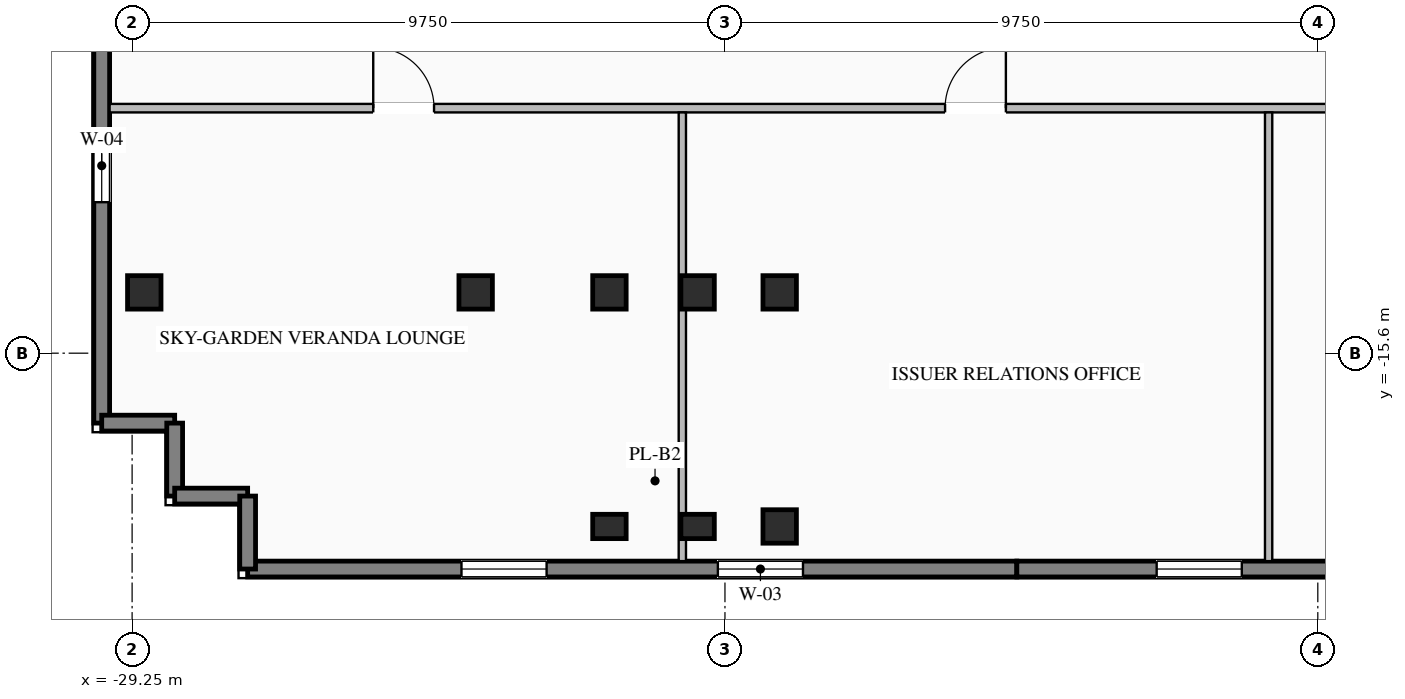
"""IFC4 building model, lengths in metres.
Left out: names, types, materials, properties, quantities, classifications, styles, units other than length and angle.
Written with IfcOpenShell. Run it as: python <this file> out.ifc"""

import sys

from ifc_helpers import new_model, si_unit, direction, frame, frame_2d, origin, origin_2d, place, context, subcontext, project, spatial, rectangle, i_section, extrude, element, fill, save


model = new_model("IFC4")
c1 = context("Model", 3, precision=1e-05, world=origin(), true_north=direction((0.0, 1.0)))
c2 = subcontext(c1, "Body", "Model", "MODEL_VIEW")
j1 = project(units=[si_unit("LENGTHUNIT", "METRE"), si_unit("PLANEANGLEUNIT", "RADIAN")], contexts=[c1])
p1 = place(None, origin())
s1 = spatial("IfcSite", under=j1, at=p1, CompositionType="ELEMENT")
p2 = place(p1, origin())
s2 = spatial("IfcBuilding", under=s1, at=p2, CompositionType="ELEMENT")
p3 = place(p2, frame((0.0, 0.0, 236.1)))
s3 = spatial("IfcBuildingStorey", under=s2, at=p3, CompositionType="ELEMENT", Elevation=236.1)
for number, where, z_axis, x_axis in (
    (1, (-21.4, -14.6, 0.0), (0.0, 0.0, 1.0), (1.0, 0.0, 0.0)),
    (2, (-19.95, -14.6, 0.0), (0.0, 0.0, 1.0), (1.0, 0.0, 0.0)),
    (3, (-18.6, -14.6, 0.0), (0.0, 0.0, 1.0), (1.0, 0.0, 0.0)),
    (4, (-23.6, -14.6, 0.0), (0.0, 0.0, 1.0), (1.0, 0.0, 0.0)),
    (5, (-18.6, -18.45, 0.0), (0.0, 0.0, 1.0), (1.0, 0.0, 0.0)),
    (6, (-29.05, -14.6, 0.0), (0.0, 0.0, 1.0), (1.0, 0.0, 0.0)),
):
    element("IfcColumn", number, at=place(p3, frame(where, z_axis=z_axis, x_axis=x_axis)), inside=s3, PredefinedType="COLUMN", context=c2, shape_type="SweptSolid", body=[
        extrude(i_section(OverallWidth=0.55, OverallDepth=0.55, WebThickness=0.024, FlangeThickness=0.036, at=origin_2d()), origin(), (0.0, 0.0, 1.0), 3.45),
    ])
for number, where, z_axis, x_axis in (
    (7, (-21.4, -18.45, 0.0), (0.0, 0.0, 1.0), (1.0, 0.0, 0.0)),
    (8, (-19.95, -18.45, 0.0), (0.0, 0.0, 1.0), (1.0, 0.0, 0.0)),
):
    element("IfcColumn", number, at=place(p3, frame(where, z_axis=z_axis, x_axis=x_axis)), inside=s3, PredefinedType="PILASTER", context=c2, shape_type="SweptSolid", body=[
        extrude(rectangle(XDim=0.55, YDim=0.4, at=origin_2d()), origin(), (0.0, 0.0, 1.0), 3.45),
    ])
p4 = place(p3, frame((-14.7, -19.15, 0.0), z_axis=(0.0, 0.0, 1.0), x_axis=(-1.0, 0.0, 0.0)))
e9 = element("IfcWall", 9, at=p4, inside=s3, PredefinedType="STANDARD", context=c2, shape_type="SweptSolid", body=[
    extrude(rectangle(XDim=12.65, YDim=0.26, at=frame_2d((6.325, 0.0))), origin(), (0.0, 0.0, 1.0), 3.25),
])
p5 = place(p4, frame((3.517, 0.0, 0.76)))
e10 = element("IfcOpeningElement", 10, at=p5, cuts=e9, PredefinedType="OPENING", context=c2, shape_type="SweptSolid", body=[
    extrude(rectangle(XDim=1.4, YDim=1.95, at=frame_2d((0.7, 0.975))), frame((0.0, 0.14, 0.0), z_axis=(0.0, -1.0, 0.0), x_axis=(1.0, 0.0, 0.0)), (0.0, 0.0, 1.0), 0.28),
])
p6 = place(p4, frame((7.733, 0.0, 0.76)))
e11 = element("IfcOpeningElement", 11, at=p6, cuts=e9, PredefinedType="OPENING", context=c2, shape_type="SweptSolid", body=[
    extrude(rectangle(XDim=1.4, YDim=1.95, at=frame_2d((0.7, 0.975))), frame((0.0, 0.14, 0.0), z_axis=(0.0, -1.0, 0.0), x_axis=(1.0, 0.0, 0.0)), (0.0, 0.0, 1.0), 0.28),
])
p7 = place(p3, frame((-5.7, -19.15, 0.0), z_axis=(0.0, 0.0, 1.0), x_axis=(-1.0, 0.0, 0.0)))
e12 = element("IfcWall", 12, at=p7, inside=s3, PredefinedType="STANDARD", context=c2, shape_type="SweptSolid", body=[
    extrude(rectangle(XDim=9.0, YDim=0.26, at=frame_2d((4.5, 0.0))), origin(), (0.0, 0.0, 1.0), 3.25),
])
p8 = place(p7, frame((2.3, 0.0, 0.76)))
e13 = element("IfcOpeningElement", 13, at=p8, cuts=e12, PredefinedType="OPENING", context=c2, shape_type="SweptSolid", body=[
    extrude(rectangle(XDim=1.4, YDim=1.95, at=frame_2d((0.7, 0.975))), frame((0.0, 0.14, 0.0), z_axis=(0.0, -1.0, 0.0), x_axis=(1.0, 0.0, 0.0)), (0.0, 0.0, 1.0), 0.28),
])
p9 = place(p7, frame((5.3, 0.0, 0.76)))
e14 = element("IfcOpeningElement", 14, at=p9, cuts=e12, PredefinedType="OPENING", context=c2, shape_type="SweptSolid", body=[
    extrude(rectangle(XDim=1.4, YDim=1.95, at=frame_2d((0.7, 0.975))), frame((0.0, 0.14, 0.0), z_axis=(0.0, -1.0, 0.0), x_axis=(1.0, 0.0, 0.0)), (0.0, 0.0, 1.0), 0.28),
])
p10 = place(p3, frame((-29.75, -16.75, 0.0), z_axis=(0.0, 0.0, 1.0), x_axis=(0.0, 1.0, 0.0)))
e15 = element("IfcWall", 15, at=p10, inside=s3, PredefinedType="STANDARD", context=c2, shape_type="SweptSolid", body=[
    extrude(rectangle(XDim=15.85, YDim=0.26, at=frame_2d((7.925, 0.0))), origin(), (0.0, 0.0, 1.0), 3.25),
])
p11 = place(p10, frame((3.633, 0.0, 0.76)))
e16 = element("IfcOpeningElement", 16, at=p11, cuts=e15, PredefinedType="OPENING", context=c2, shape_type="SweptSolid", body=[
    extrude(rectangle(XDim=1.2, YDim=1.95, at=frame_2d((0.6, 0.975))), frame((0.0, 0.14, 0.0), z_axis=(0.0, -1.0, 0.0), x_axis=(1.0, 0.0, 0.0)), (0.0, 0.0, 1.0), 0.28),
])
p12 = place(p10, frame((9.967, 0.0, 0.76)))
e17 = element("IfcOpeningElement", 17, at=p12, cuts=e15, PredefinedType="OPENING", context=c2, shape_type="SweptSolid", body=[
    extrude(rectangle(XDim=1.2, YDim=1.95, at=frame_2d((0.6, 0.975))), frame((0.0, 0.14, 0.0), z_axis=(0.0, -1.0, 0.0), x_axis=(1.0, 0.0, 0.0)), (0.0, 0.0, 1.0), 0.28),
])
for number, where, z_axis, x_axis in (
    (18, (-29.75, -16.75, 0.0), (0.0, 0.0, 1.0), (1.0, 0.0, 0.0)),
    (19, (-28.55, -16.75, 0.0), (0.0, 0.0, 1.0), (0.0, -1.0, 0.0)),
    (20, (-28.55, -17.95, 0.0), (0.0, 0.0, 1.0), (1.0, 0.0, 0.0)),
    (21, (-27.35, -17.95, 0.0), (0.0, 0.0, 1.0), (0.0, -1.0, 0.0)),
):
    element("IfcWall", number, at=place(p3, frame(where, z_axis=z_axis, x_axis=x_axis)), inside=s3, PredefinedType="STANDARD", context=c2, shape_type="SweptSolid", body=[
        extrude(rectangle(XDim=1.2, YDim=0.26, at=frame_2d((0.6, 0.0))), origin(), (0.0, 0.0, 1.0), 3.25),
    ])
p13 = place(p3, frame((-29.62, -11.57, 0.0), z_axis=(0.0, 0.0, 1.0), x_axis=(1.0, 0.0, 0.0)))
e22 = element("IfcWall", 22, at=p13, inside=s3, PredefinedType="STANDARD", context=c2, shape_type="SweptSolid", body=[
    extrude(rectangle(XDim=56.84, YDim=0.14, at=frame_2d((28.42, 0.0))), origin(), (0.0, 0.0, 1.0), 3.25),
])
p14 = place(p13, frame((29.71, 0.0, 0.0)))
e23 = element("IfcOpeningElement", 23, at=p14, cuts=e22, PredefinedType="OPENING", context=c2, shape_type="SweptSolid", body=[
    extrude(rectangle(XDim=0.92, YDim=2.08, at=frame_2d((0.46, 1.04))), frame((0.0, 0.08, 0.0), z_axis=(0.0, -1.0, 0.0), x_axis=(1.0, 0.0, 0.0)), (0.0, 0.0, 1.0), 0.16),
])
p15 = place(p13, frame((33.21, 0.0, 0.0)))
e24 = element("IfcOpeningElement", 24, at=p15, cuts=e22, PredefinedType="OPENING", context=c2, shape_type="SweptSolid", body=[
    extrude(rectangle(XDim=0.92, YDim=2.08, at=frame_2d((0.46, 1.04))), frame((0.0, 0.08, 0.0), z_axis=(0.0, -1.0, 0.0), x_axis=(1.0, 0.0, 0.0)), (0.0, 0.0, 1.0), 0.16),
])
p16 = place(p13, frame((36.06, 0.0, 0.0)))
e25 = element("IfcOpeningElement", 25, at=p16, cuts=e22, PredefinedType="OPENING", context=c2, shape_type="SweptSolid", body=[
    extrude(rectangle(XDim=0.92, YDim=2.08, at=frame_2d((0.46, 1.04))), frame((0.0, 0.08, 0.0), z_axis=(0.0, -1.0, 0.0), x_axis=(1.0, 0.0, 0.0)), (0.0, 0.0, 1.0), 0.16),
])
p17 = place(p13, frame((4.335, 0.0, 0.0)))
e26 = element("IfcOpeningElement", 26, at=p17, cuts=e22, PredefinedType="OPENING", context=c2, shape_type="SweptSolid", body=[
    extrude(rectangle(XDim=1.0, YDim=2.08, at=frame_2d((0.5, 1.04))), frame((0.0, 0.08, 0.0), z_axis=(0.0, -1.0, 0.0), x_axis=(1.0, 0.0, 0.0)), (0.0, 0.0, 1.0), 0.16),
])
p18 = place(p13, frame((13.74, 0.0, 0.0)))
e27 = element("IfcOpeningElement", 27, at=p18, cuts=e22, PredefinedType="OPENING", context=c2, shape_type="SweptSolid", body=[
    extrude(rectangle(XDim=1.0, YDim=2.08, at=frame_2d((0.5, 1.04))), frame((0.0, 0.08, 0.0), z_axis=(0.0, -1.0, 0.0), x_axis=(1.0, 0.0, 0.0)), (0.0, 0.0, 1.0), 0.16),
])
p19 = place(p13, frame((23.24, 0.0, 0.0)))
e28 = element("IfcOpeningElement", 28, at=p19, cuts=e22, PredefinedType="OPENING", context=c2, shape_type="SweptSolid", body=[
    extrude(rectangle(XDim=1.0, YDim=2.08, at=frame_2d((0.5, 1.04))), frame((0.0, 0.08, 0.0), z_axis=(0.0, -1.0, 0.0), x_axis=(1.0, 0.0, 0.0)), (0.0, 0.0, 1.0), 0.16),
])
p20 = place(p13, frame((40.281, 0.0, 0.0)))
e29 = element("IfcOpeningElement", 29, at=p20, cuts=e22, PredefinedType="OPENING", context=c2, shape_type="SweptSolid", body=[
    extrude(rectangle(XDim=1.0, YDim=2.08, at=frame_2d((0.5, 1.04))), frame((0.0, 0.08, 0.0), z_axis=(0.0, -1.0, 0.0), x_axis=(1.0, 0.0, 0.0)), (0.0, 0.0, 1.0), 0.16),
])
p21 = place(p13, frame((46.7, 0.0, 0.0)))
e30 = element("IfcOpeningElement", 30, at=p21, cuts=e22, PredefinedType="OPENING", context=c2, shape_type="SweptSolid", body=[
    extrude(rectangle(XDim=1.0, YDim=2.08, at=frame_2d((0.5, 1.04))), frame((0.0, 0.08, 0.0), z_axis=(0.0, -1.0, 0.0), x_axis=(1.0, 0.0, 0.0)), (0.0, 0.0, 1.0), 0.16),
])
p22 = place(p13, frame((53.022, 0.0, 0.0)))
e31 = element("IfcOpeningElement", 31, at=p22, cuts=e22, PredefinedType="OPENING", context=c2, shape_type="SweptSolid", body=[
    extrude(rectangle(XDim=1.0, YDim=2.08, at=frame_2d((0.5, 1.04))), frame((0.0, 0.08, 0.0), z_axis=(0.0, -1.0, 0.0), x_axis=(1.0, 0.0, 0.0)), (0.0, 0.0, 1.0), 0.16),
])
for number, where, z_axis, x_axis in (
    (32, (-20.201, -19.02, 0.0), (0.0, 0.0, 1.0), (0.0, 1.0, 0.0)),
    (33, (-10.559, -19.02, 0.0), (0.0, 0.0, 1.0), (0.0, 1.0, 0.0)),
):
    element("IfcWall", number, at=place(p3, frame(where, z_axis=z_axis, x_axis=x_axis)), inside=s3, PredefinedType="STANDARD", context=c2, shape_type="SweptSolid", body=[
        extrude(rectangle(XDim=7.38, YDim=0.12, at=frame_2d((3.69, 0.0))), origin(), (0.0, 0.0, 1.0), 3.25),
    ])
p23 = place(p5, origin())
e34 = element("IfcWindow", 34, at=p23, inside=s3, PartitioningType="SINGLE_PANEL", PredefinedType="WINDOW", context=c2, shape_type="SweptSolid", body=[
    extrude(rectangle(XDim=1.4, YDim=1.95, at=frame_2d((0.7, 0.975))), frame((0.0, 0.03, 0.0), z_axis=(0.0, -1.0, 0.0), x_axis=(1.0, 0.0, 0.0)), (0.0, 0.0, 1.0), 0.06),
])
fill(e10, e34)
p24 = place(p6, origin())
e35 = element("IfcWindow", 35, at=p24, inside=s3, PartitioningType="SINGLE_PANEL", PredefinedType="WINDOW", context=c2, shape_type="SweptSolid", body=[
    extrude(rectangle(XDim=1.4, YDim=1.95, at=frame_2d((0.7, 0.975))), frame((0.0, 0.03, 0.0), z_axis=(0.0, -1.0, 0.0), x_axis=(1.0, 0.0, 0.0)), (0.0, 0.0, 1.0), 0.06),
])
fill(e11, e35)
p25 = place(p9, origin())
e36 = element("IfcWindow", 36, at=p25, inside=s3, PartitioningType="SINGLE_PANEL", PredefinedType="WINDOW", context=c2, shape_type="SweptSolid", body=[
    extrude(rectangle(XDim=1.4, YDim=1.95, at=frame_2d((0.7, 0.975))), frame((0.0, 0.03, 0.0), z_axis=(0.0, -1.0, 0.0), x_axis=(1.0, 0.0, 0.0)), (0.0, 0.0, 1.0), 0.06),
])
fill(e14, e36)
p26 = place(p11, origin())
e37 = element("IfcWindow", 37, at=p26, inside=s3, PartitioningType="SINGLE_PANEL", PredefinedType="WINDOW", context=c2, shape_type="SweptSolid", body=[
    extrude(rectangle(XDim=1.2, YDim=1.95, at=frame_2d((0.6, 0.975))), frame((0.0, 0.03, 0.0), z_axis=(0.0, -1.0, 0.0), x_axis=(1.0, 0.0, 0.0)), (0.0, 0.0, 1.0), 0.06),
])
fill(e16, e37)
p27 = place(p17, origin())
e38 = element("IfcDoor", 38, at=p27, inside=s3, OperationType="SINGLE_SWING_LEFT", PredefinedType="DOOR", context=c2, shape_type="SweptSolid", body=[
    extrude(rectangle(XDim=1.0, YDim=2.08, at=frame_2d((0.5, 1.04))), frame((0.0, 0.025, 0.0), z_axis=(0.0, -1.0, 0.0), x_axis=(1.0, 0.0, 0.0)), (0.0, 0.0, 1.0), 0.05),
])
fill(e26, e38)
p28 = place(p18, origin())
e39 = element("IfcDoor", 39, at=p28, inside=s3, OperationType="SINGLE_SWING_RIGHT", PredefinedType="DOOR", context=c2, shape_type="SweptSolid", body=[
    extrude(rectangle(XDim=1.0, YDim=2.08, at=frame_2d((0.5, 1.04))), frame((0.0, 0.025, 0.0), z_axis=(0.0, -1.0, 0.0), x_axis=(1.0, 0.0, 0.0)), (0.0, 0.0, 1.0), 0.05),
])
fill(e27, e39)
save(model, sys.argv[1])
